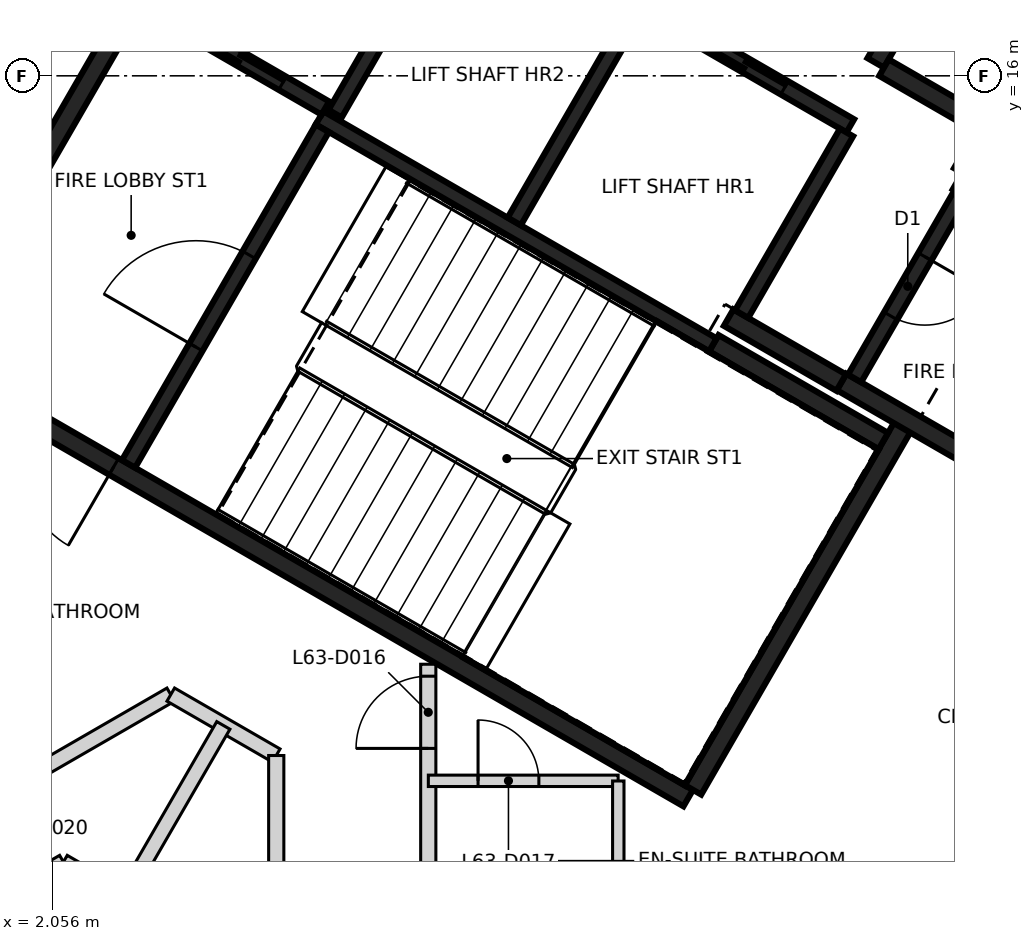
"""IFC4 building model, lengths in metres.
Left out: names, types, materials, properties, quantities, classifications, styles, units other than length and angle.
Written with IfcOpenShell. Run it as: python <this file> out.ifc"""

import sys

from ifc_helpers import new_model, si_unit, direction, frame, frame_2d, origin, place, context, subcontext, project, spatial, rectangle, extrude, element, fill, save


model = new_model("IFC4")
c1 = context("Model", 3, precision=1e-05, world=origin(), true_north=direction((0.0, 1.0)))
c2 = subcontext(c1, "Body", "Model", "MODEL_VIEW")
j1 = project(units=[si_unit("LENGTHUNIT", "METRE"), si_unit("PLANEANGLEUNIT", "RADIAN")], contexts=[c1])
p1 = place(None, origin())
s1 = spatial("IfcSite", under=j1, at=p1, CompositionType="ELEMENT")
p2 = place(p1, origin())
s2 = spatial("IfcBuilding", under=s1, at=p2, CompositionType="ELEMENT")
p3 = place(p2, frame((0.0, 0.0, 250.2)))
s3 = spatial("IfcBuildingStorey", under=s2, at=p3, CompositionType="ELEMENT", Elevation=250.2)
p4 = place(p3, frame((10.42, 6.498, 0.0), z_axis=(0.0, 0.0, 1.0), x_axis=(-0.866021906294, 0.500006057782, 0.0)))
e1 = element("IfcWall", 1, at=p4, inside=s3, PredefinedType="SHEAR", context=c2, shape_type="SweptSolid", body=[
    extrude(rectangle(XDim=11.55, YDim=0.25, at=frame_2d((5.775, 0.0))), origin(), (0.0, 0.0, 1.0), 3.25),
])
p5 = place(p4, frame((10.025, 0.0, 0.0)))
e2 = element("IfcOpeningElement", 2, at=p5, cuts=e1, PredefinedType="OPENING", context=c2, shape_type="SweptSolid", body=[
    extrude(rectangle(XDim=1.2, YDim=2.1, at=frame_2d((0.6, 1.05))), frame((0.0, 0.135, 0.0), z_axis=(0.0, -1.0, 0.0), x_axis=(1.0, 0.0, 0.0)), (0.0, 0.0, 1.0), 0.27),
])
p6 = place(p4, frame((8.725, 0.0, 0.0)))
e3 = element("IfcOpeningElement", 3, at=p6, cuts=e1, PredefinedType="OPENING", context=c2, shape_type="SweptSolid", body=[
    extrude(rectangle(XDim=1.2, YDim=2.1, at=frame_2d((0.6, 1.05))), frame((0.0, 0.135, 0.0), z_axis=(0.0, -1.0, 0.0), x_axis=(1.0, 0.0, 0.0)), (0.0, 0.0, 1.0), 0.27),
])
p7 = place(p3, frame((0.48, 12.381, 0.0), z_axis=(0.0, 0.0, 1.0), x_axis=(0.49999885962, 0.866026062182, 0.0)))
e4 = element("IfcWall", 4, at=p7, inside=s3, PredefinedType="SHEAR", context=c2, shape_type="SweptSolid", body=[
    extrude(rectangle(XDim=5.225, YDim=0.25, at=frame_2d((2.612, 0.0))), origin(), (0.0, 0.0, 1.0), 3.25),
])
p8 = place(p3, frame((13.238, 11.378, 0.0), z_axis=(0.0, 0.0, 1.0), x_axis=(-0.500008851346, -0.866020293397, 0.0)))
e5 = element("IfcWall", 5, at=p8, inside=s3, PredefinedType="SHEAR", context=c2, shape_type="SweptSolid", body=[
    extrude(rectangle(XDim=5.51, YDim=0.25, at=frame_2d((2.755, 0.0))), origin(), (0.0, 0.0, 1.0), 3.25),
])
p9 = place(p3, frame((14.918, 10.54, 0.0), z_axis=(0.0, 0.0, 1.0), x_axis=(-0.866063538972, 0.499933942099, 0.0)))
e6 = element("IfcWall", 6, at=p9, inside=s3, PredefinedType="SHEAR", context=c2, shape_type="SweptSolid", body=[
    extrude(rectangle(XDim=2.865, YDim=0.25, at=frame_2d((1.432, 0.0))), origin(), (0.0, 0.0, 1.0), 3.25),
])
p10 = place(p3, frame((13.963, 14.614, 0.0), z_axis=(0.0, 0.0, 1.0), x_axis=(0.866042235819, -0.499970844928, 0.0)))
e7 = element("IfcWall", 7, at=p10, inside=s3, PredefinedType="SHEAR", context=c2, shape_type="SweptSolid", body=[
    extrude(rectangle(XDim=2.865, YDim=0.25, at=frame_2d((1.432, 0.0))), origin(), (0.0, 0.0, 1.0), 3.25),
])
p11 = place(p3, frame((10.757, 12.481, 0.0), z_axis=(0.0, 0.0, 1.0), x_axis=(0.866022940537, -0.500004266446, 0.0)))
e8 = element("IfcWall", 8, at=p11, inside=s3, PredefinedType="SHEAR", context=c2, shape_type="SweptSolid", body=[
    extrude(rectangle(XDim=2.575, YDim=0.25, at=frame_2d((1.287, 0.0))), origin(), (0.0, 0.0, 1.0), 3.25),
])
p12 = place(p3, frame((13.819, 17.785, 0.0), z_axis=(0.0, 0.0, 1.0), x_axis=(-0.500039802285, -0.866002422705, 0.0)))
e9 = element("IfcWall", 9, at=p12, inside=s3, PredefinedType="SHEAR", context=c2, shape_type="SweptSolid", body=[
    extrude(rectangle(XDim=1.865, YDim=0.25, at=frame_2d((0.932, 0.0))), origin(), (0.0, 0.0, 1.0), 3.25),
])
p13 = place(p3, frame((12.433, 11.964, 0.0), z_axis=(0.0, 0.0, 1.0), x_axis=(-0.866038183914, 0.499977863513, 0.0)))
e10 = element("IfcWall", 10, at=p13, inside=s3, PredefinedType="SHEAR", context=c2, shape_type="SweptSolid", body=[
    extrude(rectangle(XDim=1.71, YDim=0.25, at=frame_2d((0.855, 0.0))), origin(), (0.0, 0.0, 1.0), 3.25),
])
p14 = place(p3, frame((12.995, 16.108, 0.0), z_axis=(0.0, 0.0, 1.0), x_axis=(0.866044474677, -0.49996696679, 0.0)))
e11 = element("IfcWall", 11, at=p14, inside=s3, PredefinedType="SHEAR", context=c2, shape_type="SweptSolid", body=[
    extrude(rectangle(XDim=1.584, YDim=0.25, at=frame_2d((0.792, 0.0))), origin(), (0.0, 0.0, 1.0), 3.25),
])
p15 = place(p3, frame((14.305, 15.207, 0.0), z_axis=(0.0, 0.0, 1.0), x_axis=(-0.499848422343, -0.866112899501, 0.0)))
e12 = element("IfcWall", 12, at=p15, inside=s3, PredefinedType="SHEAR", context=c2, shape_type="SweptSolid", body=[
    extrude(rectangle(XDim=0.559, YDim=0.25, at=frame_2d((0.28, 0.0))), origin(), (0.0, 0.0, 1.0), 3.25),
])
p16 = place(p3, frame((12.552, 15.342, 0.0), z_axis=(0.0, 0.0, 1.0), x_axis=(-0.866030299012, 0.499991521122, 0.0)))
e13 = element("IfcWall", 13, at=p16, inside=s3, PredefinedType="SHEAR", context=c2, shape_type="SweptSolid", body=[
    extrude(rectangle(XDim=6.1, YDim=0.2, at=frame_2d((3.05, 0.0))), origin(), (0.0, 0.0, 1.0), 3.25),
])
p17 = place(p16, frame((1.0, 0.0, 0.0)))
e14 = element("IfcOpeningElement", 14, at=p17, cuts=e13, PredefinedType="OPENING", context=c2, shape_type="SweptSolid", body=[
    extrude(rectangle(XDim=1.2, YDim=2.1, at=frame_2d((0.6, 1.05))), frame((0.0, 0.11, 0.0), z_axis=(0.0, -1.0, 0.0), x_axis=(1.0, 0.0, 0.0)), (0.0, 0.0, 1.0), 0.22),
])
p18 = place(p16, frame((3.982, 0.0, 0.0)))
e15 = element("IfcOpeningElement", 15, at=p18, cuts=e13, PredefinedType="OPENING", context=c2, shape_type="SweptSolid", body=[
    extrude(rectangle(XDim=1.2, YDim=2.1, at=frame_2d((0.6, 1.05))), frame((0.0, 0.11, 0.0), z_axis=(0.0, -1.0, 0.0), x_axis=(1.0, 0.0, 0.0)), (0.0, 0.0, 1.0), 0.22),
])
p19 = place(p3, frame((10.743, 12.46, 0.0), z_axis=(0.0, 0.0, 1.0), x_axis=(-0.866018848283, 0.500011354289, 0.0)))
e16 = element("IfcWall", 16, at=p19, inside=s3, PredefinedType="SHEAR", context=c2, shape_type="SweptSolid", body=[
    extrude(rectangle(XDim=5.974, YDim=0.2, at=frame_2d((2.987, 0.0))), origin(), (0.0, 0.0, 1.0), 3.25),
])
p20 = place(p3, frame((3.057, 10.895, 0.0), z_axis=(0.0, 0.0, 1.0), x_axis=(0.500027839223, 0.866009330205, 0.0)))
e17 = element("IfcWall", 17, at=p20, inside=s3, PredefinedType="SHEAR", context=c2, shape_type="SweptSolid", body=[
    extrude(rectangle(XDim=5.098, YDim=0.2, at=frame_2d((2.549, 0.0))), origin(), (0.0, 0.0, 1.0), 3.25),
])
p21 = place(p20, frame((1.774, 0.0, 0.0)))
e18 = element("IfcOpeningElement", 18, at=p21, cuts=e17, PredefinedType="OPENING", context=c2, shape_type="SweptSolid", body=[
    extrude(rectangle(XDim=1.4, YDim=2.1, at=frame_2d((0.7, 1.05))), frame((0.0, 0.11, 0.0), z_axis=(0.0, -1.0, 0.0), x_axis=(1.0, 0.0, 0.0)), (0.0, 0.0, 1.0), 0.22),
])
p22 = place(p3, frame((8.132, 14.084, 0.0), z_axis=(0.0, 0.0, 1.0), x_axis=(0.500030834389, 0.86600760081, 0.0)))
e19 = element("IfcWall", 19, at=p22, inside=s3, PredefinedType="SHEAR", context=c2, shape_type="SweptSolid", body=[
    extrude(rectangle(XDim=3.198, YDim=0.2, at=frame_2d((1.599, 0.0))), origin(), (0.0, 0.0, 1.0), 3.25),
])
p23 = place(p3, frame((14.008, 14.442, 0.0), z_axis=(0.0, 0.0, 1.0), x_axis=(-0.499986818241, -0.866033014143, 0.0)))
e20 = element("IfcWall", 20, at=p23, inside=s3, PredefinedType="SHEAR", context=c2, shape_type="SweptSolid", body=[
    extrude(rectangle(XDim=2.798, YDim=0.2, at=frame_2d((1.399, 0.0))), origin(), (0.0, 0.0, 1.0), 3.25),
])
p24 = place(p23, frame((0.949, 0.0, 0.0)))
e21 = element("IfcOpeningElement", 21, at=p24, cuts=e20, PredefinedType="OPENING", context=c2, shape_type="SweptSolid", body=[
    extrude(rectangle(XDim=0.9, YDim=2.1, at=frame_2d((0.45, 1.05))), frame((0.0, 0.11, 0.0), z_axis=(0.0, -1.0, 0.0), x_axis=(1.0, 0.0, 0.0)), (0.0, 0.0, 1.0), 0.22),
])
p25 = place(p3, frame((12.502, 15.255, 0.0), z_axis=(0.0, 0.0, 1.0), x_axis=(-0.499965018551, -0.866045599391, 0.0)))
e22 = element("IfcWall", 22, at=p25, inside=s3, PredefinedType="SHEAR", context=c2, shape_type="SweptSolid", body=[
    extrude(rectangle(XDim=2.759, YDim=0.2, at=frame_2d((1.379, 0.0))), origin(), (0.0, 0.0, 1.0), 3.25),
])
p26 = place(p3, frame((7.324, 18.187, 0.0), z_axis=(0.0, 0.0, 1.0), x_axis=(-0.499967891604, -0.866043940782, 0.0)))
e23 = element("IfcWall", 23, at=p26, inside=s3, PredefinedType="SHEAR", context=c2, shape_type="SweptSolid", body=[
    extrude(rectangle(XDim=3.1, YDim=0.2, at=frame_2d((1.55, 0.0))), origin(), (0.0, 0.0, 1.0), 3.25),
])
p27 = place(p3, frame((5.646, 15.576, 0.0), z_axis=(0.0, 0.0, 1.0), x_axis=(-0.866018407898, 0.500012117035, 0.0)))
e24 = element("IfcWall", 24, at=p27, inside=s3, PredefinedType="SHEAR", context=c2, shape_type="SweptSolid", body=[
    extrude(rectangle(XDim=2.651, YDim=0.2, at=frame_2d((1.325, 0.0))), origin(), (0.0, 0.0, 1.0), 3.25),
])
p28 = place(p27, frame((0.652, 0.0, 0.0)))
e25 = element("IfcOpeningElement", 25, at=p28, cuts=e24, PredefinedType="OPENING", context=c2, shape_type="SweptSolid", body=[
    extrude(rectangle(XDim=1.3, YDim=2.1, at=frame_2d((0.65, 1.05))), frame((0.0, 0.11, 0.0), z_axis=(0.0, -1.0, 0.0), x_axis=(1.0, 0.0, 0.0)), (0.0, 0.0, 1.0), 0.22),
])
p29 = place(p3, frame((-8.612, 0.801, 0.0), z_axis=(0.0, 0.0, 1.0), x_axis=(0.866005560651, 0.500034367741, 0.0)))
e26 = element("IfcWall", 26, at=p29, inside=s3, PredefinedType="PARTITIONING", context=c2, shape_type="SweptSolid", body=[
    extrude(rectangle(XDim=14.115, YDim=0.2, at=frame_2d((7.058, 0.0))), origin(), (0.0, 0.0, 1.0), 3.25),
])
p30 = place(p29, frame((10.131, 0.0, 0.0)))
e27 = element("IfcOpeningElement", 27, at=p30, cuts=e26, PredefinedType="OPENING", context=c2, shape_type="SweptSolid", body=[
    extrude(rectangle(XDim=0.9, YDim=2.1, at=frame_2d((0.45, 1.05))), frame((0.0, 0.11, 0.0), z_axis=(0.0, -1.0, 0.0), x_axis=(1.0, 0.0, 0.0)), (0.0, 0.0, 1.0), 0.22),
])
p31 = place(p29, frame((3.085, 0.0, 0.0)))
e28 = element("IfcOpeningElement", 28, at=p31, cuts=e26, PredefinedType="OPENING", context=c2, shape_type="SweptSolid", body=[
    extrude(rectangle(XDim=0.9, YDim=2.1, at=frame_2d((0.45, 1.05))), frame((0.0, 0.11, 0.0), z_axis=(0.0, -1.0, 0.0), x_axis=(1.0, 0.0, 0.0)), (0.0, 0.0, 1.0), 0.22),
])
p32 = place(p3, frame((-1.037, 12.741, 0.0), z_axis=(0.0, 0.0, 1.0), x_axis=(0.492679417867, 0.870210888929, 0.0)))
e29 = element("IfcWall", 29, at=p32, inside=s3, PredefinedType="PARTITIONING", context=c2, shape_type="SweptSolid", body=[
    extrude(rectangle(XDim=8.636, YDim=0.2, at=frame_2d((4.318, 0.0))), origin(), (0.0, 0.0, 1.0), 3.25),
])
p33 = place(p32, frame((4.438, 0.0, 0.0)))
e30 = element("IfcOpeningElement", 30, at=p33, cuts=e29, PredefinedType="OPENING", context=c2, shape_type="SweptSolid", body=[
    extrude(rectangle(XDim=0.95, YDim=2.1, at=frame_2d((0.475, 1.05))), frame((0.0, 0.11, 0.0), z_axis=(0.0, -1.0, 0.0), x_axis=(1.0, 0.0, 0.0)), (0.0, 0.0, 1.0), 0.22),
])
p34 = place(p3, frame((3.612, 7.859, 0.0), z_axis=(0.0, 0.0, 1.0), x_axis=(0.866002901518, -0.500038973044, 0.0)))
e31 = element("IfcWall", 31, at=p34, inside=s3, PredefinedType="PARTITIONING", context=c2, shape_type="SweptSolid", body=[
    extrude(rectangle(XDim=1.602, YDim=0.2, at=frame_2d((0.801, 0.0))), origin(), (0.0, 0.0, 1.0), 3.25),
])
p35 = place(p3, frame((5.0, -7.058, 0.0), z_axis=(0.0, 0.0, 1.0), x_axis=(0.0, 1.0, 0.0)))
e32 = element("IfcWall", 32, at=p35, inside=s3, PredefinedType="PARTITIONING", context=c2, shape_type="SweptSolid", body=[
    extrude(rectangle(XDim=14.116, YDim=0.2, at=frame_2d((7.058, 0.0))), origin(), (0.0, 0.0, 1.0), 3.25),
])
p36 = place(p35, frame((3.085, 0.0, 0.0)))
e33 = element("IfcOpeningElement", 33, at=p36, cuts=e32, PredefinedType="OPENING", context=c2, shape_type="SweptSolid", body=[
    extrude(rectangle(XDim=0.9, YDim=2.1, at=frame_2d((0.45, 1.05))), frame((0.0, 0.11, 0.0), z_axis=(0.0, -1.0, 0.0), x_axis=(1.0, 0.0, 0.0)), (0.0, 0.0, 1.0), 0.22),
])
p37 = place(p35, frame((10.131, 0.0, 0.0)))
e34 = element("IfcOpeningElement", 34, at=p37, cuts=e32, PredefinedType="OPENING", context=c2, shape_type="SweptSolid", body=[
    extrude(rectangle(XDim=0.9, YDim=2.1, at=frame_2d((0.45, 1.05))), frame((0.0, 0.11, 0.0), z_axis=(0.0, -1.0, 0.0), x_axis=(1.0, 0.0, 0.0)), (0.0, 0.0, 1.0), 0.22),
])
p38 = place(p3, frame((7.0, -4.625, 0.0), z_axis=(0.0, 0.0, 1.0), x_axis=(0.0, 1.0, 0.0)))
e35 = element("IfcWall", 35, at=p38, inside=s3, PredefinedType="PARTITIONING", context=c2, shape_type="SweptSolid", body=[
    extrude(rectangle(XDim=12.884, YDim=0.2, at=frame_2d((6.442, 0.0))), origin(), (0.0, 0.0, 1.0), 3.25),
])
p39 = place(p38, frame((3.931, 0.0, 0.0)))
e36 = element("IfcOpeningElement", 36, at=p39, cuts=e35, PredefinedType="OPENING", context=c2, shape_type="SweptSolid", body=[
    extrude(rectangle(XDim=1.4, YDim=2.1, at=frame_2d((0.7, 1.05))), frame((0.0, 0.11, 0.0), z_axis=(0.0, -1.0, 0.0), x_axis=(1.0, 0.0, 0.0)), (0.0, 0.0, 1.0), 0.22),
])
p40 = place(p38, frame((11.777, 0.0, 0.0)))
e37 = element("IfcOpeningElement", 37, at=p40, cuts=e35, PredefinedType="OPENING", context=c2, shape_type="SweptSolid", body=[
    extrude(rectangle(XDim=0.95, YDim=2.1, at=frame_2d((0.475, 1.05))), frame((0.0, 0.11, 0.0), z_axis=(0.0, -1.0, 0.0), x_axis=(1.0, 0.0, 0.0)), (0.0, 0.0, 1.0), 0.22),
])
p41 = place(p3, frame((-6.0, 0.924, 0.0), z_axis=(0.0, 0.0, 1.0), x_axis=(0.866012967051, 0.500021540435, 0.0)))
e38 = element("IfcWall", 38, at=p41, inside=s3, PredefinedType="PARTITIONING", context=c2, shape_type="SweptSolid", body=[
    extrude(rectangle(XDim=9.468, YDim=0.2, at=frame_2d((4.734, 0.0))), origin(), (0.0, 0.0, 1.0), 3.25),
])
p42 = place(p3, frame((2.2, 5.658, 0.0), z_axis=(0.0, 0.0, 1.0), x_axis=(0.865818011038, -0.500359042851, 0.0)))
e39 = element("IfcWall", 39, at=p42, inside=s3, PredefinedType="PARTITIONING", context=c2, shape_type="SweptSolid", body=[
    extrude(rectangle(XDim=1.848, YDim=0.2, at=frame_2d((0.924, 0.0))), origin(), (0.0, 0.0, 1.0), 3.25),
])
p43 = place(p3, frame((3.0, 5.196, 0.0), z_axis=(0.0, 0.0, 1.0), x_axis=(0.500076354988, 0.865981315724, 0.0)))
e40 = element("IfcWall", 40, at=p43, inside=s3, PredefinedType="PARTITIONING", context=c2, shape_type="SweptSolid", body=[
    extrude(rectangle(XDim=2.607, YDim=0.2, at=frame_2d((1.304, 0.0))), origin(), (0.0, 0.0, 1.0), 3.25),
])
p44 = place(p3, frame((7.001, 6.725, 0.0), z_axis=(0.0, 0.0, 1.0), x_axis=(1.0, 0.0, 0.0)))
e41 = element("IfcWall", 41, at=p44, inside=s3, PredefinedType="PARTITIONING", context=c2, shape_type="SweptSolid", body=[
    extrude(rectangle(XDim=2.497, YDim=0.15, at=frame_2d((1.249, 0.0))), origin(), (0.0, 0.0, 1.0), 3.25),
])
p45 = place(p44, frame((0.654, 0.0, 0.0)))
e42 = element("IfcOpeningElement", 42, at=p45, cuts=e41, PredefinedType="OPENING", context=c2, shape_type="SweptSolid", body=[
    extrude(rectangle(XDim=0.8, YDim=2.1, at=frame_2d((0.4, 1.05))), frame((0.0, 0.085, 0.0), z_axis=(0.0, -1.0, 0.0), x_axis=(1.0, 0.0, 0.0)), (0.0, 0.0, 1.0), 0.17),
])
p46 = place(p3, frame((9.5, 4.626, 0.0), z_axis=(0.0, 0.0, 1.0), x_axis=(0.0, 1.0, 0.0)))
e43 = element("IfcWall", 43, at=p46, inside=s3, PredefinedType="PARTITIONING", context=c2, shape_type="SweptSolid", body=[
    extrude(rectangle(XDim=2.097, YDim=0.15, at=frame_2d((1.048, 0.0))), origin(), (0.0, 0.0, 1.0), 3.25),
])
p47 = place(p28, origin())
e44 = element("IfcDoor", 44, at=p47, inside=s3, OperationType="SLIDING_TO_RIGHT", PredefinedType="DOOR", context=c2, shape_type="SweptSolid", body=[
    extrude(rectangle(XDim=1.3, YDim=2.1, at=frame_2d((0.65, 1.05))), frame((0.0, 0.025, 0.0), z_axis=(0.0, -1.0, 0.0), x_axis=(1.0, 0.0, 0.0)), (0.0, 0.0, 1.0), 0.05),
])
fill(e25, e44)
p48 = place(p17, origin())
e45 = element("IfcDoor", 45, at=p48, inside=s3, OperationType="DOUBLE_DOOR_SLIDING", PredefinedType="DOOR", context=c2, shape_type="SweptSolid", body=[
    extrude(rectangle(XDim=1.2, YDim=2.1, at=frame_2d((0.6, 1.05))), frame((0.0, 0.025, 0.0), z_axis=(0.0, -1.0, 0.0), x_axis=(1.0, 0.0, 0.0)), (0.0, 0.0, 1.0), 0.05),
])
fill(e14, e45)
p49 = place(p6, origin())
e46 = element("IfcDoor", 46, at=p49, inside=s3, OperationType="SINGLE_SWING_RIGHT", PredefinedType="DOOR", context=c2, shape_type="SweptSolid", body=[
    extrude(rectangle(XDim=1.2, YDim=2.1, at=frame_2d((0.6, 1.05))), frame((0.0, 0.025, 0.0), z_axis=(0.0, -1.0, 0.0), x_axis=(1.0, 0.0, 0.0)), (0.0, 0.0, 1.0), 0.05),
])
fill(e3, e46)
p50 = place(p21, origin())
e47 = element("IfcDoor", 47, at=p50, inside=s3, OperationType="SINGLE_SWING_RIGHT", PredefinedType="DOOR", context=c2, shape_type="SweptSolid", body=[
    extrude(rectangle(XDim=1.4, YDim=2.1, at=frame_2d((0.7, 1.05))), frame((0.0, 0.025, 0.0), z_axis=(0.0, -1.0, 0.0), x_axis=(1.0, 0.0, 0.0)), (0.0, 0.0, 1.0), 0.05),
])
fill(e18, e47)
p51 = place(p24, origin())
e48 = element("IfcDoor", 48, at=p51, inside=s3, OperationType="SINGLE_SWING_LEFT", PredefinedType="DOOR", context=c2, shape_type="SweptSolid", body=[
    extrude(rectangle(XDim=0.9, YDim=2.1, at=frame_2d((0.45, 1.05))), frame((0.0, 0.025, 0.0), z_axis=(0.0, -1.0, 0.0), x_axis=(1.0, 0.0, 0.0)), (0.0, 0.0, 1.0), 0.05),
])
fill(e21, e48)
p52 = place(p40, frame((0.95, 0.0, 0.0), z_axis=(0.0, 0.0, 1.0), x_axis=(-1.0, 0.0, 0.0)))
e49 = element("IfcDoor", 49, at=p52, inside=s3, OperationType="SINGLE_SWING_LEFT", PredefinedType="DOOR", context=c2, shape_type="SweptSolid", body=[
    extrude(rectangle(XDim=0.95, YDim=2.1, at=frame_2d((0.475, 1.05))), frame((0.0, 0.025, 0.0), z_axis=(0.0, -1.0, 0.0), x_axis=(1.0, 0.0, 0.0)), (0.0, 0.0, 1.0), 0.05),
])
fill(e37, e49)
p53 = place(p45, origin())
e50 = element("IfcDoor", 50, at=p53, inside=s3, OperationType="SINGLE_SWING_LEFT", PredefinedType="DOOR", context=c2, shape_type="SweptSolid", body=[
    extrude(rectangle(XDim=0.8, YDim=2.1, at=frame_2d((0.4, 1.05))), frame((0.0, 0.025, 0.0), z_axis=(0.0, -1.0, 0.0), x_axis=(1.0, 0.0, 0.0)), (0.0, 0.0, 1.0), 0.05),
])
fill(e42, e50)
save(model, sys.argv[1])
